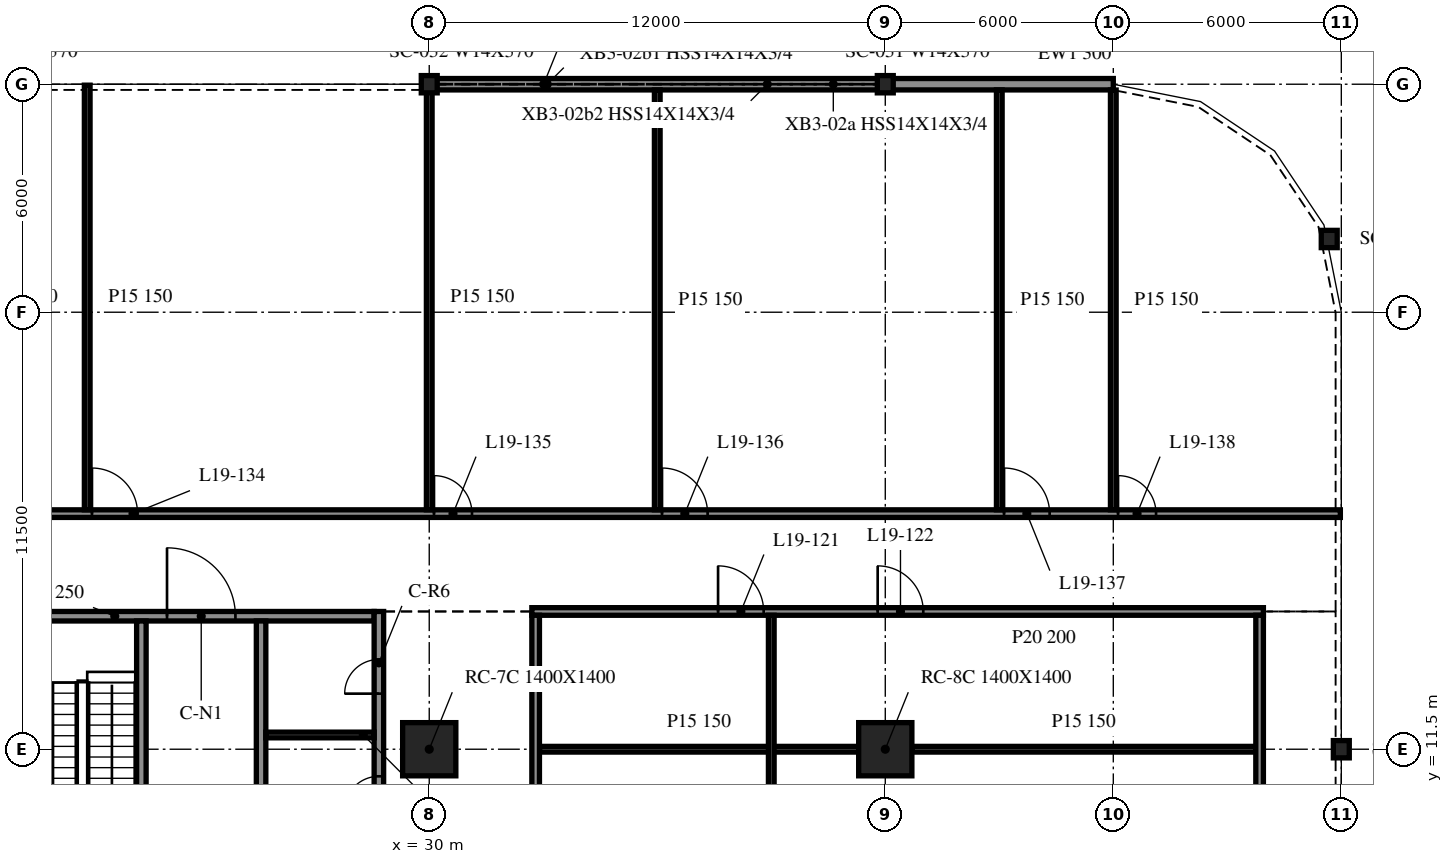
"""IFC4 building model, lengths in metres.
Left out: names, types, materials, properties, quantities, classifications, styles, units other than length and angle.
Written with IfcOpenShell. Run it as: python <this file> out.ifc"""

import sys

from ifc_helpers import new_model, si_unit, direction, frame, frame_2d, origin, origin_2d, place, context, subcontext, project, spatial, rectangle, i_section, extrude, element, fill, save


model = new_model("IFC4")
c1 = context("Model", 3, precision=1e-05, world=origin(), true_north=direction((0.0, 1.0)))
c2 = subcontext(c1, "Body", "Model", "MODEL_VIEW")
j1 = project(units=[si_unit("LENGTHUNIT", "METRE"), si_unit("PLANEANGLEUNIT", "RADIAN")], contexts=[c1])
p1 = place(None, origin())
s1 = spatial("IfcSite", under=j1, at=p1, CompositionType="ELEMENT")
p2 = place(p1, origin())
s2 = spatial("IfcBuilding", under=s1, at=p2, CompositionType="ELEMENT")
p3 = place(p2, frame((0.0, 0.0, 84.8)))
s3 = spatial("IfcBuildingStorey", under=s2, at=p3, CompositionType="ELEMENT", Elevation=84.8)
for number, where, z_axis, x_axis in (
    (1, (30.0, 11.5, -0.34), (0.0, 0.0, 1.0), (1.0, 0.0, 0.0)),
    (2, (42.0, 11.5, -0.34), (0.0, 0.0, 1.0), (1.0, 0.0, 0.0)),
):
    element("IfcColumn", number, at=place(p3, frame(where, z_axis=z_axis, x_axis=x_axis)), inside=s3, PredefinedType="COLUMN", context=c2, shape_type="SweptSolid", body=[
        extrude(rectangle(XDim=1.4, YDim=1.4, at=origin_2d()), origin(), (0.0, 0.0, 1.0), 4.1),
    ])
for number, where, z_axis, x_axis in (
    (3, (53.682, 24.927, -0.34), (0.0, 0.0, 1.0), (1.0, 0.0, 0.0)),
    (4, (42.0, 29.0, -0.34), (0.0, 0.0, 1.0), (1.0, 0.0, 0.0)),
    (5, (30.0, 29.0, -0.34), (0.0, 0.0, 1.0), (1.0, 0.0, 0.0)),
    (6, (54.0, 11.5, -0.34), (0.0, 0.0, 1.0), (1.0, 0.0, 0.0)),
):
    element("IfcColumn", number, at=place(p3, frame(where, z_axis=z_axis, x_axis=x_axis)), inside=s3, PredefinedType="COLUMN", context=c2, shape_type="SweptSolid", body=[
        extrude(i_section(OverallWidth=0.419, OverallDepth=0.455, WebThickness=0.042, FlangeThickness=0.068, at=origin_2d()), origin(), (0.0, 0.0, 1.0), 4.1),
    ])
p4 = place(p3, frame((48.0, 29.0, 0.0), z_axis=(0.0, 0.0, 1.0), x_axis=(-1.0, 0.0, 0.0)))
e7 = element("IfcWall", 7, at=p4, inside=s3, PredefinedType="NOTDEFINED", context=c2, shape_type="SweptSolid", body=[
    extrude(rectangle(XDim=5.979, YDim=0.3, at=frame_2d((2.99, 0.0))), origin(), (0.0, 0.0, 1.0), 3.003),
])
p5 = place(p3, frame((41.979, 29.0, 0.0), z_axis=(0.0, 0.0, 1.0), x_axis=(-1.0, 0.0, 0.0)))
e8 = element("IfcWall", 8, at=p5, inside=s3, PredefinedType="NOTDEFINED", context=c2, shape_type="SweptSolid", body=[
    extrude(rectangle(XDim=11.958, YDim=0.3, at=frame_2d((5.979, 0.0))), origin(), (0.0, 0.0, 1.0), 3.003),
])
p6 = place(p3, frame((28.675, -9.125, 0.0), z_axis=(0.0, 0.0, 1.0), x_axis=(0.0, 1.0, 0.0)))
e9 = element("IfcWall", 9, at=p6, inside=s3, PredefinedType="SOLIDWALL", context=c2, shape_type="SweptSolid", body=[
    extrude(rectangle(XDim=24.25, YDim=0.25, at=frame_2d((12.125, 0.0))), origin(), (0.0, 0.0, 1.0), 3.76),
])
p7 = place(p6, frame((14.425, 0.0, 0.0)))
e10 = element("IfcOpeningElement", 10, at=p7, cuts=e9, PredefinedType="OPENING", context=c2, shape_type="SweptSolid", body=[
    extrude(rectangle(XDim=0.9, YDim=2.1, at=frame_2d((0.45, 1.05))), frame((0.0, 0.135, 0.0), z_axis=(0.0, -1.0, 0.0), x_axis=(1.0, 0.0, 0.0)), (0.0, 0.0, 1.0), 0.27),
])
p8 = place(p6, frame((19.012, 0.0, 0.0)))
e11 = element("IfcOpeningElement", 11, at=p8, cuts=e9, PredefinedType="OPENING", context=c2, shape_type="SweptSolid", body=[
    extrude(rectangle(XDim=0.9, YDim=2.1, at=frame_2d((0.45, 1.05))), frame((0.0, 0.135, 0.0), z_axis=(0.0, -1.0, 0.0), x_axis=(1.0, 0.0, 0.0)), (0.0, 0.0, 1.0), 0.27),
])
p9 = place(p6, frame((22.087, 0.0, 0.0)))
e12 = element("IfcOpeningElement", 12, at=p9, cuts=e9, PredefinedType="OPENING", context=c2, shape_type="SweptSolid", body=[
    extrude(rectangle(XDim=0.9, YDim=2.1, at=frame_2d((0.45, 1.05))), frame((0.0, 0.135, 0.0), z_axis=(0.0, -1.0, 0.0), x_axis=(1.0, 0.0, 0.0)), (0.0, 0.0, 1.0), 0.27),
])
p10 = place(p3, frame((19.45, 15.0, 0.0), z_axis=(0.0, 0.0, 1.0), x_axis=(1.0, 0.0, 0.0)))
e13 = element("IfcWall", 13, at=p10, inside=s3, PredefinedType="SOLIDWALL", context=c2, shape_type="SweptSolid", body=[
    extrude(rectangle(XDim=9.1, YDim=0.25, at=frame_2d((4.55, 0.0))), origin(), (0.0, 0.0, 1.0), 3.76),
])
p11 = place(p10, frame((3.65, 0.0, 0.0)))
e14 = element("IfcOpeningElement", 14, at=p11, cuts=e13, PredefinedType="OPENING", context=c2, shape_type="SweptSolid", body=[
    extrude(rectangle(XDim=1.8, YDim=2.1, at=frame_2d((0.9, 1.05))), frame((0.0, 0.135, 0.0), z_axis=(0.0, -1.0, 0.0), x_axis=(1.0, 0.0, 0.0)), (0.0, 0.0, 1.0), 0.27),
])
p12 = place(p3, frame((22.425, 14.875, 0.0), z_axis=(0.0, 0.0, 1.0), x_axis=(0.0, -1.0, 0.0)))
e15 = element("IfcWall", 15, at=p12, inside=s3, PredefinedType="SOLIDWALL", context=c2, shape_type="SweptSolid", body=[
    extrude(rectangle(XDim=6.25, YDim=0.25, at=frame_2d((3.125, 0.0))), origin(), (0.0, 0.0, 1.0), 3.76),
])
p13 = place(p12, frame((4.85, 0.0, 0.0)))
e16 = element("IfcOpeningElement", 16, at=p13, cuts=e15, PredefinedType="OPENING", context=c2, shape_type="SweptSolid", body=[
    extrude(rectangle(XDim=1.0, YDim=2.1, at=frame_2d((0.5, 1.05))), frame((0.0, 0.135, 0.0), z_axis=(0.0, -1.0, 0.0), x_axis=(1.0, 0.0, 0.0)), (0.0, 0.0, 1.0), 0.27),
])
p14 = place(p3, frame((25.575, 14.875, 0.0), z_axis=(0.0, 0.0, 1.0), x_axis=(0.0, -1.0, 0.0)))
e17 = element("IfcWall", 17, at=p14, inside=s3, PredefinedType="SOLIDWALL", context=c2, shape_type="SweptSolid", body=[
    extrude(rectangle(XDim=17.5, YDim=0.25, at=frame_2d((8.75, 0.0))), origin(), (0.0, 0.0, 1.0), 3.76),
])
p15 = place(p14, frame((15.45, 0.0, 0.0)))
e18 = element("IfcOpeningElement", 18, at=p15, cuts=e17, PredefinedType="OPENING", context=c2, shape_type="SweptSolid", body=[
    extrude(rectangle(XDim=1.1, YDim=2.1, at=frame_2d((0.55, 1.05))), frame((0.0, 0.135, 0.0), z_axis=(0.0, -1.0, 0.0), x_axis=(1.0, 0.0, 0.0)), (0.0, 0.0, 1.0), 0.27),
])
p16 = place(p14, frame((12.8, 0.0, 0.0)))
e19 = element("IfcOpeningElement", 19, at=p16, cuts=e17, PredefinedType="OPENING", context=c2, shape_type="SweptSolid", body=[
    extrude(rectangle(XDim=0.9, YDim=2.1, at=frame_2d((0.45, 1.05))), frame((0.0, 0.135, 0.0), z_axis=(0.0, -1.0, 0.0), x_axis=(1.0, 0.0, 0.0)), (0.0, 0.0, 1.0), 0.27),
])
p17 = place(p3, frame((25.7, 11.875, 0.0), z_axis=(0.0, 0.0, 1.0), x_axis=(1.0, 0.0, 0.0)))
e20 = element("IfcWall", 20, at=p17, inside=s3, PredefinedType="PARTITIONING", context=c2, shape_type="SweptSolid", body=[
    extrude(rectangle(XDim=2.85, YDim=0.15, at=frame_2d((1.425, 0.0))), origin(), (0.0, 0.0, 1.0), 3.76),
])
p18 = place(p3, frame((32.9, 11.5, 0.0), z_axis=(0.0, 0.0, 1.0), x_axis=(1.0, 0.0, 0.0)))
e21 = element("IfcWall", 21, at=p18, inside=s3, PredefinedType="PARTITIONING", context=c2, shape_type="SweptSolid", body=[
    extrude(rectangle(XDim=8.4, YDim=0.15, at=frame_2d((4.2, 0.0))), origin(), (0.0, 0.0, 1.0), 3.76),
])
p19 = place(p3, frame((42.7, 11.5, 0.0), z_axis=(0.0, 0.0, 1.0), x_axis=(1.0, 0.0, 0.0)))
e22 = element("IfcWall", 22, at=p19, inside=s3, PredefinedType="PARTITIONING", context=c2, shape_type="SweptSolid", body=[
    extrude(rectangle(XDim=9.05, YDim=0.15, at=frame_2d((4.525, 0.0))), origin(), (0.0, 0.0, 1.0), 3.76),
])
p20 = place(p3, frame((32.7, 15.125, 0.0), z_axis=(0.0, 0.0, 1.0), x_axis=(1.0, 0.0, 0.0)))
e23 = element("IfcWall", 23, at=p20, inside=s3, PredefinedType="PARTITIONING", context=c2, shape_type="SweptSolid", body=[
    extrude(rectangle(XDim=19.25, YDim=0.2, at=frame_2d((9.625, 0.0))), origin(), (0.0, 0.0, 1.0), 3.76),
])
p21 = place(p20, frame((4.9, 0.0, 0.0)))
e24 = element("IfcOpeningElement", 24, at=p21, cuts=e23, PredefinedType="OPENING", context=c2, shape_type="SweptSolid", body=[
    extrude(rectangle(XDim=1.2, YDim=2.1, at=frame_2d((0.6, 1.05))), frame((0.0, 0.11, 0.0), z_axis=(0.0, -1.0, 0.0), x_axis=(1.0, 0.0, 0.0)), (0.0, 0.0, 1.0), 0.22),
])
p22 = place(p20, frame((9.1, 0.0, 0.0)))
e25 = element("IfcOpeningElement", 25, at=p22, cuts=e23, PredefinedType="OPENING", context=c2, shape_type="SweptSolid", body=[
    extrude(rectangle(XDim=1.2, YDim=2.1, at=frame_2d((0.6, 1.05))), frame((0.0, 0.11, 0.0), z_axis=(0.0, -1.0, 0.0), x_axis=(1.0, 0.0, 0.0)), (0.0, 0.0, 1.0), 0.22),
])
p23 = place(p3, frame((-41.975, 17.7, 0.0), z_axis=(0.0, 0.0, 1.0), x_axis=(1.0, 0.0, 0.0)))
e26 = element("IfcWall", 26, at=p23, inside=s3, PredefinedType="PARTITIONING", context=c2, shape_type="SweptSolid", body=[
    extrude(rectangle(XDim=95.95, YDim=0.2, at=frame_2d((47.975, 0.0))), origin(), (0.0, 0.0, 1.0), 3.76),
])
p24 = place(p23, frame((4.5, 0.0, 0.0)))
e27 = element("IfcOpeningElement", 27, at=p24, cuts=e26, PredefinedType="OPENING", context=c2, shape_type="SweptSolid", body=[
    extrude(rectangle(XDim=1.0, YDim=2.1, at=frame_2d((0.5, 1.05))), frame((0.0, 0.11, 0.0), z_axis=(0.0, -1.0, 0.0), x_axis=(1.0, 0.0, 0.0)), (0.0, 0.0, 1.0), 0.22),
])
p25 = place(p23, frame((13.3, 0.0, 0.0)))
e28 = element("IfcOpeningElement", 28, at=p25, cuts=e26, PredefinedType="OPENING", context=c2, shape_type="SweptSolid", body=[
    extrude(rectangle(XDim=1.2, YDim=2.1, at=frame_2d((0.6, 1.05))), frame((0.0, 0.11, 0.0), z_axis=(0.0, -1.0, 0.0), x_axis=(1.0, 0.0, 0.0)), (0.0, 0.0, 1.0), 0.22),
])
p26 = place(p23, frame((16.3, 0.0, 0.0)))
e29 = element("IfcOpeningElement", 29, at=p26, cuts=e26, PredefinedType="OPENING", context=c2, shape_type="SweptSolid", body=[
    extrude(rectangle(XDim=1.2, YDim=2.1, at=frame_2d((0.6, 1.05))), frame((0.0, 0.11, 0.0), z_axis=(0.0, -1.0, 0.0), x_axis=(1.0, 0.0, 0.0)), (0.0, 0.0, 1.0), 0.22),
])
p27 = place(p23, frame((22.5, 0.0, 0.0)))
e30 = element("IfcOpeningElement", 30, at=p27, cuts=e26, PredefinedType="OPENING", context=c2, shape_type="SweptSolid", body=[
    extrude(rectangle(XDim=1.0, YDim=2.1, at=frame_2d((0.5, 1.05))), frame((0.0, 0.11, 0.0), z_axis=(0.0, -1.0, 0.0), x_axis=(1.0, 0.0, 0.0)), (0.0, 0.0, 1.0), 0.22),
])
p28 = place(p23, frame((25.3, 0.0, 0.0)))
e31 = element("IfcOpeningElement", 31, at=p28, cuts=e26, PredefinedType="OPENING", context=c2, shape_type="SweptSolid", body=[
    extrude(rectangle(XDim=1.2, YDim=2.1, at=frame_2d((0.6, 1.05))), frame((0.0, 0.11, 0.0), z_axis=(0.0, -1.0, 0.0), x_axis=(1.0, 0.0, 0.0)), (0.0, 0.0, 1.0), 0.22),
])
p29 = place(p23, frame((34.3, 0.0, 0.0)))
e32 = element("IfcOpeningElement", 32, at=p29, cuts=e26, PredefinedType="OPENING", context=c2, shape_type="SweptSolid", body=[
    extrude(rectangle(XDim=1.2, YDim=2.1, at=frame_2d((0.6, 1.05))), frame((0.0, 0.11, 0.0), z_axis=(0.0, -1.0, 0.0), x_axis=(1.0, 0.0, 0.0)), (0.0, 0.0, 1.0), 0.22),
])
p30 = place(p23, frame((42.7, 0.0, 0.0)))
e33 = element("IfcOpeningElement", 33, at=p30, cuts=e26, PredefinedType="OPENING", context=c2, shape_type="SweptSolid", body=[
    extrude(rectangle(XDim=1.0, YDim=2.1, at=frame_2d((0.5, 1.05))), frame((0.0, 0.11, 0.0), z_axis=(0.0, -1.0, 0.0), x_axis=(1.0, 0.0, 0.0)), (0.0, 0.0, 1.0), 0.22),
])
p31 = place(p23, frame((47.3, 0.0, 0.0)))
e34 = element("IfcOpeningElement", 34, at=p31, cuts=e26, PredefinedType="OPENING", context=c2, shape_type="SweptSolid", body=[
    extrude(rectangle(XDim=1.2, YDim=2.1, at=frame_2d((0.6, 1.05))), frame((0.0, 0.11, 0.0), z_axis=(0.0, -1.0, 0.0), x_axis=(1.0, 0.0, 0.0)), (0.0, 0.0, 1.0), 0.22),
])
p32 = place(p23, frame((51.1, 0.0, 0.0)))
e35 = element("IfcOpeningElement", 35, at=p32, cuts=e26, PredefinedType="OPENING", context=c2, shape_type="SweptSolid", body=[
    extrude(rectangle(XDim=1.2, YDim=2.1, at=frame_2d((0.6, 1.05))), frame((0.0, 0.11, 0.0), z_axis=(0.0, -1.0, 0.0), x_axis=(1.0, 0.0, 0.0)), (0.0, 0.0, 1.0), 0.22),
])
p33 = place(p23, frame((54.1, 0.0, 0.0)))
e36 = element("IfcOpeningElement", 36, at=p33, cuts=e26, PredefinedType="OPENING", context=c2, shape_type="SweptSolid", body=[
    extrude(rectangle(XDim=1.0, YDim=2.1, at=frame_2d((0.5, 1.05))), frame((0.0, 0.11, 0.0), z_axis=(0.0, -1.0, 0.0), x_axis=(1.0, 0.0, 0.0)), (0.0, 0.0, 1.0), 0.22),
])
p34 = place(p23, frame((60.1, 0.0, 0.0)))
e37 = element("IfcOpeningElement", 37, at=p34, cuts=e26, PredefinedType="OPENING", context=c2, shape_type="SweptSolid", body=[
    extrude(rectangle(XDim=1.2, YDim=2.1, at=frame_2d((0.6, 1.05))), frame((0.0, 0.11, 0.0), z_axis=(0.0, -1.0, 0.0), x_axis=(1.0, 0.0, 0.0)), (0.0, 0.0, 1.0), 0.22),
])
p35 = place(p23, frame((63.1, 0.0, 0.0)))
e38 = element("IfcOpeningElement", 38, at=p35, cuts=e26, PredefinedType="OPENING", context=c2, shape_type="SweptSolid", body=[
    extrude(rectangle(XDim=1.2, YDim=2.1, at=frame_2d((0.6, 1.05))), frame((0.0, 0.11, 0.0), z_axis=(0.0, -1.0, 0.0), x_axis=(1.0, 0.0, 0.0)), (0.0, 0.0, 1.0), 0.22),
])
p36 = place(p23, frame((72.1, 0.0, 0.0)))
e39 = element("IfcOpeningElement", 39, at=p36, cuts=e26, PredefinedType="OPENING", context=c2, shape_type="SweptSolid", body=[
    extrude(rectangle(XDim=1.0, YDim=2.1, at=frame_2d((0.5, 1.05))), frame((0.0, 0.11, 0.0), z_axis=(0.0, -1.0, 0.0), x_axis=(1.0, 0.0, 0.0)), (0.0, 0.0, 1.0), 0.22),
])
p37 = place(p23, frame((78.1, 0.0, 0.0)))
e40 = element("IfcOpeningElement", 40, at=p37, cuts=e26, PredefinedType="OPENING", context=c2, shape_type="SweptSolid", body=[
    extrude(rectangle(XDim=1.2, YDim=2.1, at=frame_2d((0.6, 1.05))), frame((0.0, 0.11, 0.0), z_axis=(0.0, -1.0, 0.0), x_axis=(1.0, 0.0, 0.0)), (0.0, 0.0, 1.0), 0.22),
])
p38 = place(p23, frame((87.1, 0.0, 0.0)))
e41 = element("IfcOpeningElement", 41, at=p38, cuts=e26, PredefinedType="OPENING", context=c2, shape_type="SweptSolid", body=[
    extrude(rectangle(XDim=1.2, YDim=2.1, at=frame_2d((0.6, 1.05))), frame((0.0, 0.11, 0.0), z_axis=(0.0, -1.0, 0.0), x_axis=(1.0, 0.0, 0.0)), (0.0, 0.0, 1.0), 0.22),
])
p39 = place(p23, frame((90.1, 0.0, 0.0)))
e42 = element("IfcOpeningElement", 42, at=p39, cuts=e26, PredefinedType="OPENING", context=c2, shape_type="SweptSolid", body=[
    extrude(rectangle(XDim=1.0, YDim=2.1, at=frame_2d((0.5, 1.05))), frame((0.0, 0.11, 0.0), z_axis=(0.0, -1.0, 0.0), x_axis=(1.0, 0.0, 0.0)), (0.0, 0.0, 1.0), 0.22),
])
for number, where, z_axis, x_axis in (
    (43, (21.0, 17.8, 0.0), (0.0, 0.0, 1.0), (0.0, 1.0, 0.0)),
    (44, (30.0, 17.8, 0.0), (0.0, 0.0, 1.0), (0.0, 1.0, 0.0)),
):
    element("IfcWall", number, at=place(p3, frame(where, z_axis=z_axis, x_axis=x_axis)), inside=s3, PredefinedType="PARTITIONING", context=c2, shape_type="SweptSolid", body=[
        extrude(rectangle(XDim=11.175, YDim=0.15, at=frame_2d((5.587, 0.0))), origin(), (0.0, 0.0, 1.0), 3.76),
    ])
p40 = place(p3, frame((32.8, -9.025, 0.0), z_axis=(0.0, 0.0, 1.0), x_axis=(0.0, 1.0, 0.0)))
e45 = element("IfcWall", 45, at=p40, inside=s3, PredefinedType="PARTITIONING", context=c2, shape_type="SweptSolid", body=[
    extrude(rectangle(XDim=24.05, YDim=0.2, at=frame_2d((12.025, 0.0))), origin(), (0.0, 0.0, 1.0), 3.76),
])
p41 = place(p40, frame((11.5, 0.0, 0.0)))
e46 = element("IfcOpeningElement", 46, at=p41, cuts=e45, PredefinedType="OPENING", context=c2, shape_type="SweptSolid", body=[
    extrude(rectangle(XDim=1.2, YDim=2.1, at=frame_2d((0.6, 1.05))), frame((0.0, 0.11, 0.0), z_axis=(0.0, -1.0, 0.0), x_axis=(1.0, 0.0, 0.0)), (0.0, 0.0, 1.0), 0.22),
])
p42 = place(p3, frame((36.0, 17.8, 0.0), z_axis=(0.0, 0.0, 1.0), x_axis=(0.0, 1.0, 0.0)))
e47 = element("IfcWall", 47, at=p42, inside=s3, PredefinedType="PARTITIONING", context=c2, shape_type="SweptSolid", body=[
    extrude(rectangle(XDim=11.05, YDim=0.15, at=frame_2d((5.525, 0.0))), origin(), (0.0, 0.0, 1.0), 3.76),
])
p43 = place(p3, frame((39.0, -9.025, 0.0), z_axis=(0.0, 0.0, 1.0), x_axis=(0.0, 1.0, 0.0)))
e48 = element("IfcWall", 48, at=p43, inside=s3, PredefinedType="PARTITIONING", context=c2, shape_type="SweptSolid", body=[
    extrude(rectangle(XDim=24.05, YDim=0.15, at=frame_2d((12.025, 0.0))), origin(), (0.0, 0.0, 1.0), 3.76),
])
p44 = place(p3, frame((45.0, 17.8, 0.0), z_axis=(0.0, 0.0, 1.0), x_axis=(0.0, 1.0, 0.0)))
e49 = element("IfcWall", 49, at=p44, inside=s3, PredefinedType="PARTITIONING", context=c2, shape_type="SweptSolid", body=[
    extrude(rectangle(XDim=11.05, YDim=0.15, at=frame_2d((5.525, 0.0))), origin(), (0.0, 0.0, 1.0), 3.76),
])
p45 = place(p3, frame((48.0, 17.8, 0.0), z_axis=(0.0, 0.0, 1.0), x_axis=(0.0, 1.0, 0.0)))
e50 = element("IfcWall", 50, at=p45, inside=s3, PredefinedType="PARTITIONING", context=c2, shape_type="SweptSolid", body=[
    extrude(rectangle(XDim=11.047, YDim=0.15, at=frame_2d((5.523, 0.0))), origin(), (0.0, 0.0, 1.0), 3.76),
])
p46 = place(p3, frame((51.85, -9.025, 0.0), z_axis=(0.0, 0.0, 1.0), x_axis=(0.0, 1.0, 0.0)))
e51 = element("IfcWall", 51, at=p46, inside=s3, PredefinedType="PARTITIONING", context=c2, shape_type="SweptSolid", body=[
    extrude(rectangle(XDim=24.05, YDim=0.2, at=frame_2d((12.025, 0.0))), origin(), (0.0, 0.0, 1.0), 3.76),
])
p47 = place(p11, origin())
e52 = element("IfcDoor", 52, at=p47, inside=s3, OperationType="DOUBLE_DOOR_SINGLE_SWING", PredefinedType="DOOR", context=c2, shape_type="SweptSolid", body=[
    extrude(rectangle(XDim=1.8, YDim=2.1, at=frame_2d((0.9, 1.05))), frame((0.0, 0.025, 0.0), z_axis=(0.0, -1.0, 0.0), x_axis=(1.0, 0.0, 0.0)), (0.0, 0.0, 1.0), 0.05),
])
fill(e14, e52)
p48 = place(p8, origin())
e53 = element("IfcDoor", 53, at=p48, inside=s3, OperationType="SINGLE_SWING_LEFT", PredefinedType="DOOR", context=c2, shape_type="SweptSolid", body=[
    extrude(rectangle(XDim=0.9, YDim=2.1, at=frame_2d((0.45, 1.05))), frame((0.0, 0.025, 0.0), z_axis=(0.0, -1.0, 0.0), x_axis=(1.0, 0.0, 0.0)), (0.0, 0.0, 1.0), 0.05),
])
fill(e11, e53)
p49 = place(p9, origin())
e54 = element("IfcDoor", 54, at=p49, inside=s3, OperationType="SINGLE_SWING_RIGHT", PredefinedType="DOOR", context=c2, shape_type="SweptSolid", body=[
    extrude(rectangle(XDim=0.9, YDim=2.1, at=frame_2d((0.45, 1.05))), frame((0.0, 0.025, 0.0), z_axis=(0.0, -1.0, 0.0), x_axis=(1.0, 0.0, 0.0)), (0.0, 0.0, 1.0), 0.05),
])
fill(e12, e54)
p50 = place(p21, origin())
e55 = element("IfcDoor", 55, at=p50, inside=s3, OperationType="SINGLE_SWING_RIGHT", PredefinedType="DOOR", context=c2, shape_type="SweptSolid", body=[
    extrude(rectangle(XDim=1.2, YDim=2.1, at=frame_2d((0.6, 1.05))), frame((0.0, 0.025, 0.0), z_axis=(0.0, -1.0, 0.0), x_axis=(1.0, 0.0, 0.0)), (0.0, 0.0, 1.0), 0.05),
])
fill(e24, e55)
p51 = place(p22, origin())
e56 = element("IfcDoor", 56, at=p51, inside=s3, OperationType="SINGLE_SWING_LEFT", PredefinedType="DOOR", context=c2, shape_type="SweptSolid", body=[
    extrude(rectangle(XDim=1.2, YDim=2.1, at=frame_2d((0.6, 1.05))), frame((0.0, 0.025, 0.0), z_axis=(0.0, -1.0, 0.0), x_axis=(1.0, 0.0, 0.0)), (0.0, 0.0, 1.0), 0.05),
])
fill(e25, e56)
p52 = place(p35, origin())
e57 = element("IfcDoor", 57, at=p52, inside=s3, OperationType="SINGLE_SWING_RIGHT", PredefinedType="DOOR", context=c2, shape_type="SweptSolid", body=[
    extrude(rectangle(XDim=1.2, YDim=2.1, at=frame_2d((0.6, 1.05))), frame((0.0, 0.025, 0.0), z_axis=(0.0, -1.0, 0.0), x_axis=(1.0, 0.0, 0.0)), (0.0, 0.0, 1.0), 0.05),
])
fill(e38, e57)
p53 = place(p36, origin())
e58 = element("IfcDoor", 58, at=p53, inside=s3, OperationType="SINGLE_SWING_RIGHT", PredefinedType="DOOR", context=c2, shape_type="SweptSolid", body=[
    extrude(rectangle(XDim=1.0, YDim=2.1, at=frame_2d((0.5, 1.05))), frame((0.0, 0.025, 0.0), z_axis=(0.0, -1.0, 0.0), x_axis=(1.0, 0.0, 0.0)), (0.0, 0.0, 1.0), 0.05),
])
fill(e39, e58)
p54 = place(p37, origin())
e59 = element("IfcDoor", 59, at=p54, inside=s3, OperationType="SINGLE_SWING_RIGHT", PredefinedType="DOOR", context=c2, shape_type="SweptSolid", body=[
    extrude(rectangle(XDim=1.2, YDim=2.1, at=frame_2d((0.6, 1.05))), frame((0.0, 0.025, 0.0), z_axis=(0.0, -1.0, 0.0), x_axis=(1.0, 0.0, 0.0)), (0.0, 0.0, 1.0), 0.05),
])
fill(e40, e59)
p55 = place(p38, origin())
e60 = element("IfcDoor", 60, at=p55, inside=s3, OperationType="SINGLE_SWING_RIGHT", PredefinedType="DOOR", context=c2, shape_type="SweptSolid", body=[
    extrude(rectangle(XDim=1.2, YDim=2.1, at=frame_2d((0.6, 1.05))), frame((0.0, 0.025, 0.0), z_axis=(0.0, -1.0, 0.0), x_axis=(1.0, 0.0, 0.0)), (0.0, 0.0, 1.0), 0.05),
])
fill(e41, e60)
p56 = place(p39, origin())
e61 = element("IfcDoor", 61, at=p56, inside=s3, OperationType="SINGLE_SWING_RIGHT", PredefinedType="DOOR", context=c2, shape_type="SweptSolid", body=[
    extrude(rectangle(XDim=1.0, YDim=2.1, at=frame_2d((0.5, 1.05))), frame((0.0, 0.025, 0.0), z_axis=(0.0, -1.0, 0.0), x_axis=(1.0, 0.0, 0.0)), (0.0, 0.0, 1.0), 0.05),
])
fill(e42, e61)
save(model, sys.argv[1])
